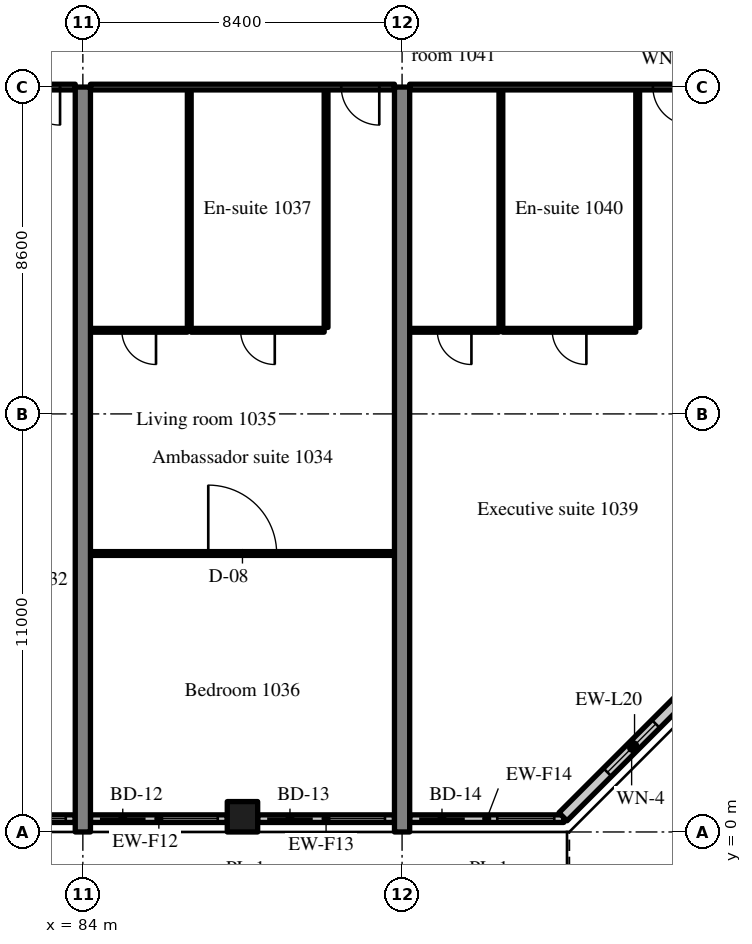
"""IFC4 building model, lengths in metres.
Left out: names, types, materials, properties, quantities, classifications, styles, units other than length and angle.
Written with IfcOpenShell. Run it as: python <this file> out.ifc"""

import sys

from ifc_helpers import new_model, si_unit, direction, frame, frame_2d, origin, origin_2d, place, context, subcontext, project, spatial, rectangle, extrude, source, transform, mapped, element, fill, save


model = new_model("IFC4")
c1 = context("Model", 3, precision=1e-05, world=origin(), true_north=direction((0.0, 1.0)))
c2 = subcontext(c1, "Body", "Model", "MODEL_VIEW")
j1 = project(units=[si_unit("LENGTHUNIT", "METRE"), si_unit("PLANEANGLEUNIT", "RADIAN")], contexts=[c1])
p1 = place(None, origin())
s1 = spatial("IfcSite", under=j1, at=p1, CompositionType="ELEMENT")
p2 = place(p1, origin())
s2 = spatial("IfcBuilding", under=s1, at=p2, CompositionType="ELEMENT")
p3 = place(p2, frame((0.0, 0.0, 46.8)))
s3 = spatial("IfcBuildingStorey", under=s2, at=p3, CompositionType="ELEMENT", Elevation=46.8)
m1 = source(origin(), c2, "Body", "SweptSolid", [
    extrude(rectangle(XDim=19.6, YDim=0.4, at=frame_2d((9.8, 0.0))), origin(), (0.0, 0.0, 1.0), 3.52),
])
for number, where, z_axis, x_axis in (
    (1, (84.0, 0.0, 0.0), (0.0, 0.0, 1.0), (0.0, 1.0, 0.0)),
    (2, (92.4, 0.0, 0.0), (0.0, 0.0, 1.0), (0.0, 1.0, 0.0)),
):
    element("IfcWall", number, at=place(p3, frame(where, z_axis=z_axis, x_axis=x_axis)), inside=s3, PredefinedType="SHEAR", context=c2, shape_type="MappedRepresentation", body=[
        mapped(m1, transform((0.0, 0.0, 0.0), scale=1.0)),
    ])
m2 = source(origin(), c2, "Body", "SweptSolid", [
    extrude(rectangle(XDim=0.8, YDim=0.8, at=origin_2d()), origin(), (0.0, 0.0, 1.0), 3.52),
])
p4 = place(p3, frame((88.2, 0.4, 0.0), z_axis=(0.0, 0.0, 1.0), x_axis=(1.0, 0.0, 0.0)))
e3 = element("IfcColumn", 3, at=p4, inside=s3, PredefinedType="COLUMN", context=c2, shape_type="MappedRepresentation", body=[
    mapped(m2, transform((0.0, 0.0, 0.0), scale=1.0)),
])
m3 = source(origin(), c2, "Body", "SweptSolid", [
    extrude(rectangle(XDim=3.6, YDim=0.2, at=frame_2d((1.8, 0.0))), origin(), (0.0, 0.0, 1.0), 2.82),
])
p5 = place(p3, frame((80.2, 0.35, 0.0), z_axis=(0.0, 0.0, 1.0), x_axis=(1.0, 0.0, 0.0)))
e4 = element("IfcWall", 4, at=p5, inside=s3, PredefinedType="SOLIDWALL", context=c2, shape_type="MappedRepresentation", body=[
    mapped(m3, transform((0.0, 0.0, 0.0), scale=1.0)),
])
m4 = source(origin(), c2, "Body", "SweptSolid", [
    extrude(rectangle(XDim=1.2, YDim=2.4, at=frame_2d((0.6, 1.2))), frame((0.0, 0.11, 0.0), z_axis=(0.0, -1.0, 0.0), x_axis=(1.0, 0.0, 0.0)), (0.0, 0.0, 1.0), 0.22),
])
p6 = place(p5, frame((0.25, 0.0, 0.0)))
e5 = element("IfcOpeningElement", 5, at=p6, cuts=e4, PredefinedType="OPENING", context=c2, shape_type="MappedRepresentation", body=[
    mapped(m4, transform((0.0, 0.0, 0.0), scale=1.0)),
])
m5 = source(origin(), c2, "Body", "SweptSolid", [
    extrude(rectangle(XDim=1.5, YDim=1.5, at=frame_2d((0.75, 0.75))), frame((0.0, 0.11, 0.0), z_axis=(0.0, -1.0, 0.0), x_axis=(1.0, 0.0, 0.0)), (0.0, 0.0, 1.0), 0.22),
])
p7 = place(p5, frame((1.85, 0.0, 0.9)))
e6 = element("IfcOpeningElement", 6, at=p7, cuts=e4, PredefinedType="OPENING", context=c2, shape_type="MappedRepresentation", body=[
    mapped(m5, transform((0.0, 0.0, 0.0), scale=1.0)),
])
p8 = place(p3, frame((84.2, 0.35, 0.0), z_axis=(0.0, 0.0, 1.0), x_axis=(1.0, 0.0, 0.0)))
e7 = element("IfcWall", 7, at=p8, inside=s3, PredefinedType="SOLIDWALL", context=c2, shape_type="MappedRepresentation", body=[
    mapped(m3, transform((0.0, 0.0, 0.0), scale=1.0)),
])
p9 = place(p8, frame((0.25, 0.0, 0.0)))
e8 = element("IfcOpeningElement", 8, at=p9, cuts=e7, PredefinedType="OPENING", context=c2, shape_type="MappedRepresentation", body=[
    mapped(m4, transform((0.0, 0.0, 0.0), scale=1.0)),
])
p10 = place(p8, frame((1.85, 0.0, 0.9)))
e9 = element("IfcOpeningElement", 9, at=p10, cuts=e7, PredefinedType="OPENING", context=c2, shape_type="MappedRepresentation", body=[
    mapped(m5, transform((0.0, 0.0, 0.0), scale=1.0)),
])
m6 = source(origin(), c2, "Body", "SweptSolid", [
    extrude(rectangle(XDim=3.6, YDim=0.2, at=frame_2d((1.8, 0.0))), origin(), (0.0, 0.0, 1.0), 2.82),
])
p11 = place(p3, frame((88.6, 0.35, 0.0), z_axis=(0.0, 0.0, 1.0), x_axis=(1.0, 0.0, 0.0)))
e10 = element("IfcWall", 10, at=p11, inside=s3, PredefinedType="SOLIDWALL", context=c2, shape_type="MappedRepresentation", body=[
    mapped(m6, transform((0.0, 0.0, 0.0), scale=1.0)),
])
p12 = place(p11, frame((0.25, 0.0, 0.0)))
e11 = element("IfcOpeningElement", 11, at=p12, cuts=e10, PredefinedType="OPENING", context=c2, shape_type="MappedRepresentation", body=[
    mapped(m4, transform((0.0, 0.0, 0.0), scale=1.0)),
])
p13 = place(p11, frame((1.85, 0.0, 0.9)))
e12 = element("IfcOpeningElement", 12, at=p13, cuts=e10, PredefinedType="OPENING", context=c2, shape_type="MappedRepresentation", body=[
    mapped(m5, transform((0.0, 0.0, 0.0), scale=1.0)),
])
m7 = source(origin(), c2, "Body", "SweptSolid", [
    extrude(rectangle(XDim=4.055, YDim=0.2, at=frame_2d((2.027, 0.0))), origin(), (0.0, 0.0, 1.0), 2.82),
])
p14 = place(p3, frame((92.6, 0.35, 0.0), z_axis=(0.0, 0.0, 1.0), x_axis=(1.0, 0.0, 0.0)))
e13 = element("IfcWall", 13, at=p14, inside=s3, PredefinedType="SOLIDWALL", context=c2, shape_type="MappedRepresentation", body=[
    mapped(m7, transform((0.0, 0.0, 0.0), scale=1.0)),
])
p15 = place(p14, frame((0.25, 0.0, 0.0)))
e14 = element("IfcOpeningElement", 14, at=p15, cuts=e13, PredefinedType="OPENING", context=c2, shape_type="MappedRepresentation", body=[
    mapped(m4, transform((0.0, 0.0, 0.0), scale=1.0)),
])
p16 = place(p14, frame((2.305, 0.0, 0.9)))
e15 = element("IfcOpeningElement", 15, at=p16, cuts=e13, PredefinedType="OPENING", context=c2, shape_type="MappedRepresentation", body=[
    mapped(m5, transform((0.0, 0.0, 0.0), scale=1.0)),
])
m8 = source(origin(), c2, "Body", "SweptSolid", [
    extrude(rectangle(XDim=5.326, YDim=0.3, at=frame_2d((2.663, 0.0))), origin(), (0.0, 0.0, 1.0), 3.52),
])
p17 = place(p3, frame((96.634, 0.4, 0.0), z_axis=(0.0, 0.0, 1.0), x_axis=(0.707083859269, 0.707129702361, 0.0)))
e16 = element("IfcWall", 16, at=p17, inside=s3, PredefinedType="SOLIDWALL", context=c2, shape_type="MappedRepresentation", body=[
    mapped(m8, transform((0.0, 0.0, 0.0), scale=1.0)),
])
m9 = source(origin(), c2, "Body", "SweptSolid", [
    extrude(rectangle(XDim=1.8, YDim=1.5, at=frame_2d((0.9, 0.75))), frame((0.0, 0.16, 0.0), z_axis=(0.0, -1.0, 0.0), x_axis=(1.0, 0.0, 0.0)), (0.0, 0.0, 1.0), 0.32),
])
p18 = place(p17, frame((1.654, 0.0, 0.9)))
e17 = element("IfcOpeningElement", 17, at=p18, cuts=e16, PredefinedType="OPENING", context=c2, shape_type="MappedRepresentation", body=[
    mapped(m9, transform((0.0, 0.0, 0.0), scale=1.0)),
])
m10 = source(origin(), c2, "Body", "SweptSolid", [
    extrude(rectangle(XDim=3.925, YDim=0.15, at=frame_2d((1.962, 0.0))), origin(), (0.0, 0.0, 1.0), 2.82),
])
p19 = place(p3, frame((79.875, 19.6, 0.0), z_axis=(0.0, 0.0, 1.0), x_axis=(1.0, 0.0, 0.0)))
e18 = element("IfcWall", 18, at=p19, inside=s3, PredefinedType="PARTITIONING", context=c2, shape_type="MappedRepresentation", body=[
    mapped(m10, transform((0.0, 0.0, 0.0), scale=1.0)),
])
m11 = source(origin(), c2, "Body", "SweptSolid", [
    extrude(rectangle(XDim=1.0, YDim=2.1, at=frame_2d((0.5, 1.05))), frame((0.0, 0.085, 0.0), z_axis=(0.0, -1.0, 0.0), x_axis=(1.0, 0.0, 0.0)), (0.0, 0.0, 1.0), 0.17),
])
p20 = place(p19, frame((2.525, 0.0, 0.0)))
e19 = element("IfcOpeningElement", 19, at=p20, cuts=e18, PredefinedType="OPENING", context=c2, shape_type="MappedRepresentation", body=[
    mapped(m11, transform((0.0, 0.0, 0.0), scale=1.0)),
])
m12 = source(origin(), c2, "Body", "SweptSolid", [
    extrude(rectangle(XDim=6.25, YDim=0.1, at=frame_2d((3.125, 0.0))), origin(), (0.0, 0.0, 1.0), 3.52),
])
for number, where, z_axis, x_axis in (
    (20, (90.4, 13.275, 0.0), (0.0, 0.0, 1.0), (0.0, 1.0, 0.0)),
    (21, (86.8, 13.275, 0.0), (0.0, 0.0, 1.0), (0.0, 1.0, 0.0)),
):
    element("IfcWall", number, at=place(p3, frame(where, z_axis=z_axis, x_axis=x_axis)), inside=s3, PredefinedType="PARTITIONING", context=c2, shape_type="MappedRepresentation", body=[
        mapped(m12, transform((0.0, 0.0, 0.0), scale=1.0)),
    ])
m13 = source(origin(), c2, "Body", "SweptSolid", [
    extrude(rectangle(XDim=3.5, YDim=0.1, at=frame_2d((1.75, 0.0))), origin(), (0.0, 0.0, 1.0), 3.52),
])
p21 = place(p3, frame((86.85, 13.2, 0.0), z_axis=(0.0, 0.0, 1.0), x_axis=(1.0, 0.0, 0.0)))
e22 = element("IfcWall", 22, at=p21, inside=s3, PredefinedType="PARTITIONING", context=c2, shape_type="MappedRepresentation", body=[
    mapped(m13, transform((0.0, 0.0, 0.0), scale=1.0)),
])
m14 = source(origin(), c2, "Body", "SweptSolid", [
    extrude(rectangle(XDim=0.9, YDim=2.1, at=frame_2d((0.45, 1.05))), frame((0.0, 0.06, 0.0), z_axis=(0.0, -1.0, 0.0), x_axis=(1.0, 0.0, 0.0)), (0.0, 0.0, 1.0), 0.12),
])
p22 = place(p21, frame((1.3, 0.0, 0.0)))
e23 = element("IfcOpeningElement", 23, at=p22, cuts=e22, PredefinedType="OPENING", context=c2, shape_type="MappedRepresentation", body=[
    mapped(m14, transform((0.0, 0.0, 0.0), scale=1.0)),
])
m15 = source(origin(), c2, "Body", "SweptSolid", [
    extrude(rectangle(XDim=2.55, YDim=0.1, at=frame_2d((1.275, 0.0))), origin(), (0.0, 0.0, 1.0), 3.52),
])
p23 = place(p3, frame((84.2, 13.2, 0.0), z_axis=(0.0, 0.0, 1.0), x_axis=(1.0, 0.0, 0.0)))
e24 = element("IfcWall", 24, at=p23, inside=s3, PredefinedType="PARTITIONING", context=c2, shape_type="MappedRepresentation", body=[
    mapped(m15, transform((0.0, 0.0, 0.0), scale=1.0)),
])
p24 = place(p23, frame((0.825, 0.0, 0.0)))
e25 = element("IfcOpeningElement", 25, at=p24, cuts=e24, PredefinedType="OPENING", context=c2, shape_type="MappedRepresentation", body=[
    mapped(m14, transform((0.0, 0.0, 0.0), scale=1.0)),
])
m16 = source(origin(), c2, "Body", "SweptSolid", [
    extrude(rectangle(XDim=8.0, YDim=0.1, at=frame_2d((4.0, 0.0))), origin(), (0.0, 0.0, 1.0), 3.52),
])
p25 = place(p3, frame((84.2, 7.327, 0.0), z_axis=(0.0, 0.0, 1.0), x_axis=(1.0, 0.0, 0.0)))
e26 = element("IfcWall", 26, at=p25, inside=s3, PredefinedType="PARTITIONING", context=c2, shape_type="MappedRepresentation", body=[
    mapped(m16, transform((0.0, 0.0, 0.0), scale=1.0)),
])
m17 = source(origin(), c2, "Body", "SweptSolid", [
    extrude(rectangle(XDim=1.8, YDim=2.1, at=frame_2d((0.9, 1.05))), frame((0.0, 0.06, 0.0), z_axis=(0.0, -1.0, 0.0), x_axis=(1.0, 0.0, 0.0)), (0.0, 0.0, 1.0), 0.12),
])
p26 = place(p25, frame((3.1, 0.0, 0.0)))
e27 = element("IfcOpeningElement", 27, at=p26, cuts=e26, PredefinedType="OPENING", context=c2, shape_type="MappedRepresentation", body=[
    mapped(m17, transform((0.0, 0.0, 0.0), scale=1.0)),
])
m18 = source(origin(), c2, "Body", "SweptSolid", [
    extrude(rectangle(XDim=8.0, YDim=0.15, at=frame_2d((4.0, 0.0))), origin(), (0.0, 0.0, 1.0), 2.82),
])
p27 = place(p3, frame((84.2, 19.6, 0.0), z_axis=(0.0, 0.0, 1.0), x_axis=(1.0, 0.0, 0.0)))
e28 = element("IfcWall", 28, at=p27, inside=s3, PredefinedType="PARTITIONING", context=c2, shape_type="MappedRepresentation", body=[
    mapped(m18, transform((0.0, 0.0, 0.0), scale=1.0)),
])
p28 = place(p27, frame((6.6, 0.0, 0.0)))
e29 = element("IfcOpeningElement", 29, at=p28, cuts=e28, PredefinedType="OPENING", context=c2, shape_type="MappedRepresentation", body=[
    mapped(m11, transform((0.0, 0.0, 0.0), scale=1.0)),
])
for number, where, z_axis, x_axis in (
    (30, (98.6, 13.275, 0.0), (0.0, 0.0, 1.0), (0.0, 1.0, 0.0)),
    (31, (95.0, 13.275, 0.0), (0.0, 0.0, 1.0), (0.0, 1.0, 0.0)),
):
    element("IfcWall", number, at=place(p3, frame(where, z_axis=z_axis, x_axis=x_axis)), inside=s3, PredefinedType="PARTITIONING", context=c2, shape_type="MappedRepresentation", body=[
        mapped(m12, transform((0.0, 0.0, 0.0), scale=1.0)),
    ])
p29 = place(p3, frame((95.05, 13.2, 0.0), z_axis=(0.0, 0.0, 1.0), x_axis=(1.0, 0.0, 0.0)))
e32 = element("IfcWall", 32, at=p29, inside=s3, PredefinedType="PARTITIONING", context=c2, shape_type="MappedRepresentation", body=[
    mapped(m13, transform((0.0, 0.0, 0.0), scale=1.0)),
])
p30 = place(p29, frame((1.3, 0.0, 0.0)))
e33 = element("IfcOpeningElement", 33, at=p30, cuts=e32, PredefinedType="OPENING", context=c2, shape_type="MappedRepresentation", body=[
    mapped(m14, transform((0.0, 0.0, 0.0), scale=1.0)),
])
m19 = source(origin(), c2, "Body", "SweptSolid", [
    extrude(rectangle(XDim=2.35, YDim=0.1, at=frame_2d((1.175, 0.0))), origin(), (0.0, 0.0, 1.0), 3.52),
])
p31 = place(p3, frame((92.6, 13.2, 0.0), z_axis=(0.0, 0.0, 1.0), x_axis=(1.0, 0.0, 0.0)))
e34 = element("IfcWall", 34, at=p31, inside=s3, PredefinedType="PARTITIONING", context=c2, shape_type="MappedRepresentation", body=[
    mapped(m19, transform((0.0, 0.0, 0.0), scale=1.0)),
])
p32 = place(p31, frame((0.725, 0.0, 0.0)))
e35 = element("IfcOpeningElement", 35, at=p32, cuts=e34, PredefinedType="OPENING", context=c2, shape_type="MappedRepresentation", body=[
    mapped(m14, transform((0.0, 0.0, 0.0), scale=1.0)),
])
m20 = source(origin(), c2, "Body", "SweptSolid", [
    extrude(rectangle(XDim=7.8, YDim=0.15, at=frame_2d((3.9, 0.0))), origin(), (0.0, 0.0, 1.0), 2.82),
])
p33 = place(p3, frame((92.6, 19.6, 0.0), z_axis=(0.0, 0.0, 1.0), x_axis=(1.0, 0.0, 0.0)))
e36 = element("IfcWall", 36, at=p33, inside=s3, PredefinedType="PARTITIONING", context=c2, shape_type="MappedRepresentation", body=[
    mapped(m20, transform((0.0, 0.0, 0.0), scale=1.0)),
])
p34 = place(p33, frame((6.4, 0.0, 0.0)))
e37 = element("IfcOpeningElement", 37, at=p34, cuts=e36, PredefinedType="OPENING", context=c2, shape_type="MappedRepresentation", body=[
    mapped(m11, transform((0.0, 0.0, 0.0), scale=1.0)),
])
m21 = source(origin(), c2, "Body", "SweptSolid", [
    extrude(rectangle(XDim=1.5, YDim=1.5, at=frame_2d((0.75, 0.75))), frame((0.0, 0.03, 0.0), z_axis=(0.0, -1.0, 0.0), x_axis=(1.0, 0.0, 0.0)), (0.0, 0.0, 1.0), 0.06),
])
p35 = place(p7, origin())
e38 = element("IfcWindow", 38, at=p35, inside=s3, PartitioningType="SINGLE_PANEL", PredefinedType="WINDOW", context=c2, shape_type="MappedRepresentation", body=[
    mapped(m21, transform((0.0, 0.0, 0.0), scale=1.0)),
])
fill(e6, e38)
m22 = source(origin(), c2, "Body", "SweptSolid", [
    extrude(rectangle(XDim=1.2, YDim=2.4, at=frame_2d((0.6, 1.2))), frame((0.0, 0.025, 0.0), z_axis=(0.0, -1.0, 0.0), x_axis=(1.0, 0.0, 0.0)), (0.0, 0.0, 1.0), 0.05),
])
p36 = place(p9, origin())
e39 = element("IfcDoor", 39, at=p36, inside=s3, OperationType="SLIDING_TO_RIGHT", PredefinedType="DOOR", context=c2, shape_type="MappedRepresentation", body=[
    mapped(m22, transform((0.0, 0.0, 0.0), scale=1.0)),
])
fill(e8, e39)
p37 = place(p10, origin())
e40 = element("IfcWindow", 40, at=p37, inside=s3, PartitioningType="SINGLE_PANEL", PredefinedType="WINDOW", context=c2, shape_type="MappedRepresentation", body=[
    mapped(m21, transform((0.0, 0.0, 0.0), scale=1.0)),
])
fill(e9, e40)
p38 = place(p12, origin())
e41 = element("IfcDoor", 41, at=p38, inside=s3, OperationType="SLIDING_TO_LEFT", PredefinedType="DOOR", context=c2, shape_type="MappedRepresentation", body=[
    mapped(m22, transform((0.0, 0.0, 0.0), scale=1.0)),
])
fill(e11, e41)
p39 = place(p13, origin())
e42 = element("IfcWindow", 42, at=p39, inside=s3, PartitioningType="SINGLE_PANEL", PredefinedType="WINDOW", context=c2, shape_type="MappedRepresentation", body=[
    mapped(m21, transform((0.0, 0.0, 0.0), scale=1.0)),
])
fill(e12, e42)
p40 = place(p15, origin())
e43 = element("IfcDoor", 43, at=p40, inside=s3, OperationType="SLIDING_TO_RIGHT", PredefinedType="DOOR", context=c2, shape_type="MappedRepresentation", body=[
    mapped(m22, transform((0.0, 0.0, 0.0), scale=1.0)),
])
fill(e14, e43)
p41 = place(p16, origin())
e44 = element("IfcWindow", 44, at=p41, inside=s3, PartitioningType="SINGLE_PANEL", PredefinedType="WINDOW", context=c2, shape_type="MappedRepresentation", body=[
    mapped(m21, transform((0.0, 0.0, 0.0), scale=1.0)),
])
fill(e15, e44)
m23 = source(origin(), c2, "Body", "SweptSolid", [
    extrude(rectangle(XDim=1.8, YDim=1.5, at=frame_2d((0.9, 0.75))), frame((0.0, 0.03, 0.0), z_axis=(0.0, -1.0, 0.0), x_axis=(1.0, 0.0, 0.0)), (0.0, 0.0, 1.0), 0.06),
])
p42 = place(p18, origin())
e45 = element("IfcWindow", 45, at=p42, inside=s3, PartitioningType="SINGLE_PANEL", PredefinedType="WINDOW", context=c2, shape_type="MappedRepresentation", body=[
    mapped(m23, transform((0.0, 0.0, 0.0), scale=1.0)),
])
fill(e17, e45)
m24 = source(origin(), c2, "Body", "SweptSolid", [
    extrude(rectangle(XDim=1.0, YDim=2.1, at=frame_2d((0.5, 1.05))), frame((0.0, 0.025, 0.0), z_axis=(0.0, -1.0, 0.0), x_axis=(1.0, 0.0, 0.0)), (0.0, 0.0, 1.0), 0.05),
])
p43 = place(p20, origin())
e46 = element("IfcDoor", 46, at=p43, inside=s3, OperationType="SINGLE_SWING_RIGHT", PredefinedType="DOOR", context=c2, shape_type="MappedRepresentation", body=[
    mapped(m24, transform((0.0, 0.0, 0.0), scale=1.0)),
])
fill(e19, e46)
m25 = source(origin(), c2, "Body", "SweptSolid", [
    extrude(rectangle(XDim=0.9, YDim=2.1, at=frame_2d((0.45, 1.05))), frame((0.0, 0.025, 0.0), z_axis=(0.0, -1.0, 0.0), x_axis=(1.0, 0.0, 0.0)), (0.0, 0.0, 1.0), 0.05),
])
p44 = place(p22, origin())
e47 = element("IfcDoor", 47, at=p44, inside=s3, OperationType="SINGLE_SWING_RIGHT", PredefinedType="DOOR", context=c2, shape_type="MappedRepresentation", body=[
    mapped(m25, transform((0.0, 0.0, 0.0), scale=1.0)),
])
fill(e23, e47)
p45 = place(p24, origin())
e48 = element("IfcDoor", 48, at=p45, inside=s3, OperationType="SINGLE_SWING_RIGHT", PredefinedType="DOOR", context=c2, shape_type="MappedRepresentation", body=[
    mapped(m25, transform((0.0, 0.0, 0.0), scale=1.0)),
])
fill(e25, e48)
m26 = source(origin(), c2, "Body", "SweptSolid", [
    extrude(rectangle(XDim=1.8, YDim=2.1, at=frame_2d((0.9, 1.05))), frame((0.0, 0.025, 0.0), z_axis=(0.0, -1.0, 0.0), x_axis=(1.0, 0.0, 0.0)), (0.0, 0.0, 1.0), 0.05),
])
p46 = place(p26, origin())
e49 = element("IfcDoor", 49, at=p46, inside=s3, OperationType="DOUBLE_DOOR_SINGLE_SWING", PredefinedType="DOOR", context=c2, shape_type="MappedRepresentation", body=[
    mapped(m26, transform((0.0, 0.0, 0.0), scale=1.0)),
])
fill(e27, e49)
p47 = place(p28, origin())
e50 = element("IfcDoor", 50, at=p47, inside=s3, OperationType="SINGLE_SWING_RIGHT", PredefinedType="DOOR", context=c2, shape_type="MappedRepresentation", body=[
    mapped(m24, transform((0.0, 0.0, 0.0), scale=1.0)),
])
fill(e29, e50)
p48 = place(p30, origin())
e51 = element("IfcDoor", 51, at=p48, inside=s3, OperationType="SINGLE_SWING_RIGHT", PredefinedType="DOOR", context=c2, shape_type="MappedRepresentation", body=[
    mapped(m25, transform((0.0, 0.0, 0.0), scale=1.0)),
])
fill(e33, e51)
p49 = place(p32, origin())
e52 = element("IfcDoor", 52, at=p49, inside=s3, OperationType="SINGLE_SWING_RIGHT", PredefinedType="DOOR", context=c2, shape_type="MappedRepresentation", body=[
    mapped(m25, transform((0.0, 0.0, 0.0), scale=1.0)),
])
fill(e35, e52)
p50 = place(p34, origin())
e53 = element("IfcDoor", 53, at=p50, inside=s3, OperationType="SINGLE_SWING_RIGHT", PredefinedType="DOOR", context=c2, shape_type="MappedRepresentation", body=[
    mapped(m24, transform((0.0, 0.0, 0.0), scale=1.0)),
])
fill(e37, e53)
save(model, sys.argv[1])
